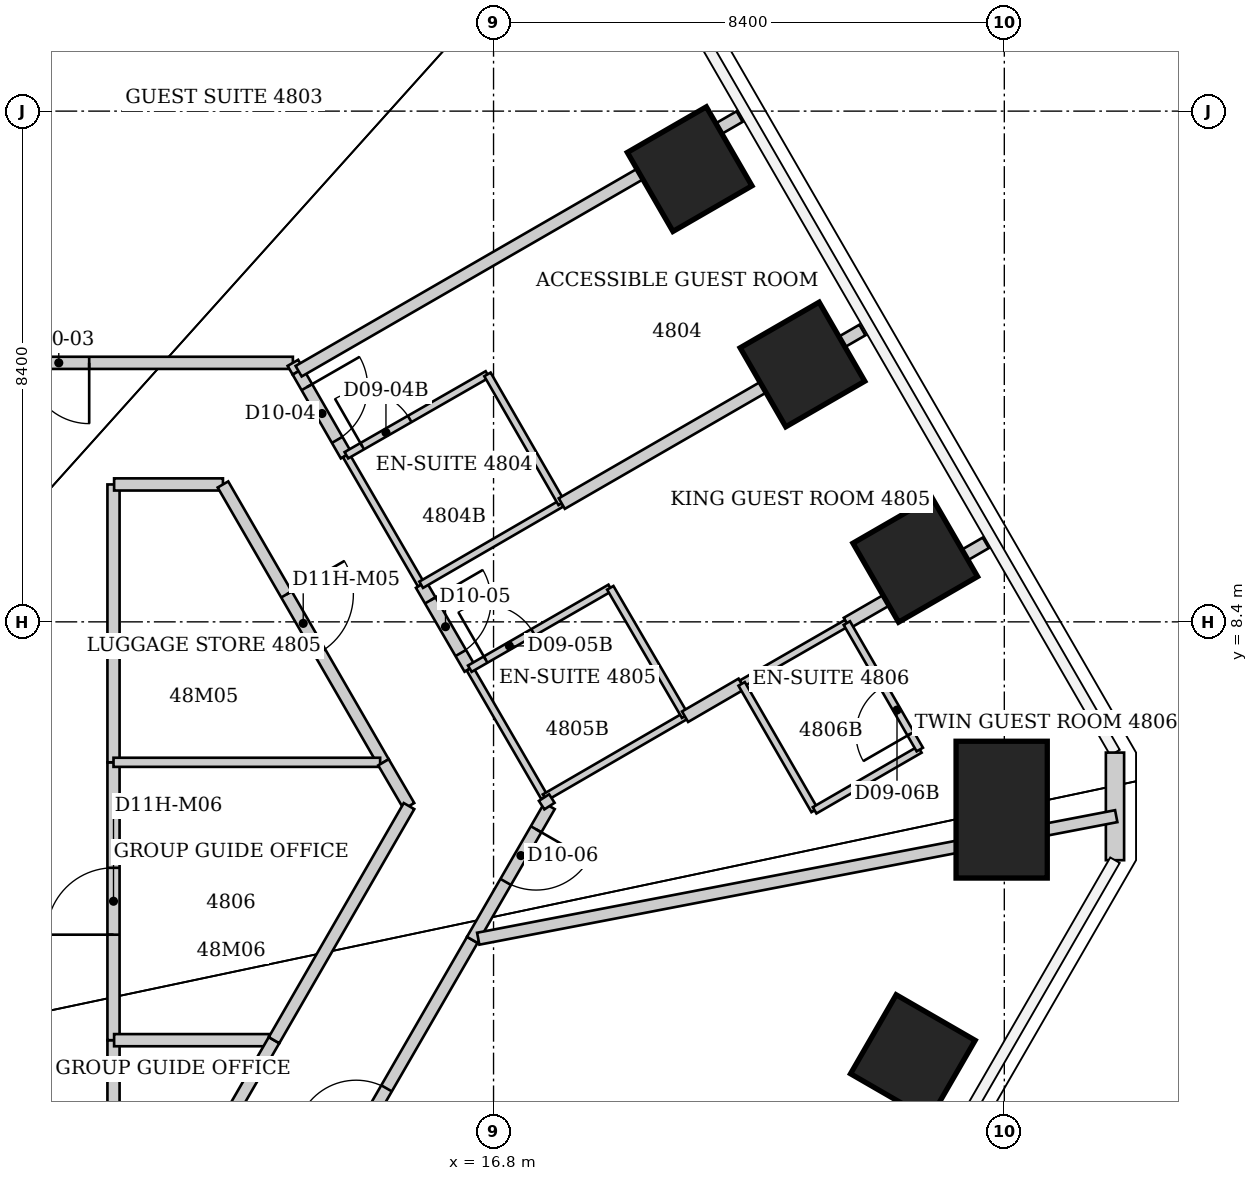
"""IFC4 building model, lengths in metres.
Left out: names, types, materials, properties, quantities, classifications, styles, units other than length and angle.
Written with IfcOpenShell. Run it as: python <this file> out.ifc"""

import sys

from ifc_helpers import new_model, si_unit, direction, frame, frame_2d, origin, origin_2d, place, context, subcontext, project, spatial, rectangle, extrude, element, fill, save


model = new_model("IFC4")
c1 = context("Model", 3, precision=1e-05, world=origin(), true_north=direction((0.0, 1.0)))
c2 = subcontext(c1, "Body", "Model", "MODEL_VIEW")
j1 = project(units=[si_unit("LENGTHUNIT", "METRE"), si_unit("PLANEANGLEUNIT", "RADIAN")], contexts=[c1])
p1 = place(None, origin())
s1 = spatial("IfcSite", under=j1, at=p1, CompositionType="ELEMENT")
p2 = place(p1, origin())
s2 = spatial("IfcBuilding", under=s1, at=p2, CompositionType="ELEMENT")
p3 = place(p2, frame((0.0, 0.0, 194.6)))
s3 = spatial("IfcBuildingStorey", under=s2, at=p3, CompositionType="ELEMENT", Elevation=194.6)
for number, where, z_axis, x_axis in (
    (1, (20.025, 15.846, 0.0), (0.0, 0.0, 1.0), (0.866, 0.5, 0.0)),
    (2, (21.88, 12.633, 0.0), (0.0, 0.0, 1.0), (0.866, 0.5, 0.0)),
    (3, (23.735, 9.419, 0.0), (0.0, 0.0, 1.0), (0.866, 0.5, 0.0)),
):
    element("IfcColumn", number, at=place(p3, frame(where, z_axis=z_axis, x_axis=x_axis)), inside=s3, PredefinedType="COLUMN", context=c2, shape_type="SweptSolid", body=[
        extrude(rectangle(XDim=1.5, YDim=1.5, at=origin_2d()), origin(), (0.0, 0.0, 1.0), 3.8),
    ])
p4 = place(p3, frame((25.156, 5.311, 0.0), z_axis=(0.0, 0.0, 1.0), x_axis=(1.0, 0.0, 0.0)))
e4 = element("IfcColumn", 4, at=p4, inside=s3, PredefinedType="COLUMN", context=c2, shape_type="SweptSolid", body=[
    extrude(rectangle(XDim=1.5, YDim=2.25, at=origin_2d()), origin(), (0.0, 0.0, 1.0), 3.8),
])
p5 = place(p3, frame((23.696, 1.242, 0.0), z_axis=(0.0, 0.0, 1.0), x_axis=(0.866025403784, -0.5, 0.0)))
e5 = element("IfcColumn", 5, at=p5, inside=s3, PredefinedType="COLUMN", context=c2, shape_type="SweptSolid", body=[
    extrude(rectangle(XDim=1.5, YDim=1.5, at=origin_2d()), origin(), (0.0, 0.0, 1.0), 3.8),
])
p6 = place(p3, frame((27.02, 6.25, 0.0), z_axis=(0.0, 0.0, 1.0), x_axis=(0.0, -1.0, 0.0)))
e6 = element("IfcWall", 6, at=p6, inside=s3, PredefinedType="SOLIDWALL", context=c2, shape_type="SweptSolid", body=[
    extrude(rectangle(XDim=1.77, YDim=0.3, at=frame_2d((0.885, 0.0))), origin(), (0.0, 0.0, 1.0), 3.64),
])
p7 = place(p3, frame((10.55, -2.855, 0.0), z_axis=(0.0, 0.0, 1.0), x_axis=(0.0, 1.0, 0.0)))
e7 = element("IfcWall", 7, at=p7, inside=s3, PredefinedType="PARTITIONING", context=c2, shape_type="SweptSolid", body=[
    extrude(rectangle(XDim=4.375, YDim=0.2, at=frame_2d((2.188, 0.0))), origin(), (0.0, 0.0, 1.0), 3.64),
])
p8 = place(p3, frame((10.55, 1.52, 0.0), z_axis=(0.0, 0.0, 1.0), x_axis=(0.0, 1.0, 0.0)))
e8 = element("IfcWall", 8, at=p8, inside=s3, PredefinedType="PARTITIONING", context=c2, shape_type="SweptSolid", body=[
    extrude(rectangle(XDim=4.57, YDim=0.2, at=frame_2d((2.285, 0.0))), origin(), (0.0, 0.0, 1.0), 3.64),
])
p9 = place(p8, frame((1.735, 0.0, 0.0)))
e9 = element("IfcOpeningElement", 9, at=p9, cuts=e8, PredefinedType="OPENING", context=c2, shape_type="SweptSolid", body=[
    extrude(rectangle(XDim=1.1, YDim=2.2, at=frame_2d((0.55, 1.1))), frame((0.0, 0.1, 0.0), z_axis=(0.0, -1.0, 0.0), x_axis=(1.0, 0.0, 0.0)), (0.0, 0.0, 1.0), 0.2),
])
p10 = place(p3, frame((10.55, 6.09, 0.0), z_axis=(0.0, 0.0, 1.0), x_axis=(0.0, 1.0, 0.0)))
e10 = element("IfcWall", 10, at=p10, inside=s3, PredefinedType="PARTITIONING", context=c2, shape_type="SweptSolid", body=[
    extrude(rectangle(XDim=4.57, YDim=0.2, at=frame_2d((2.285, 0.0))), origin(), (0.0, 0.0, 1.0), 3.64),
])
p11 = place(p3, frame((10.56, 1.52, 0.0), z_axis=(0.0, 0.0, 1.0), x_axis=(1.0, 0.0, 0.0)))
e11 = element("IfcWall", 11, at=p11, inside=s3, PredefinedType="PARTITIONING", context=c2, shape_type="SweptSolid", body=[
    extrude(rectangle(XDim=2.55, YDim=0.2, at=frame_2d((1.275, 0.0))), origin(), (0.0, 0.0, 1.0), 3.64),
])
p12 = place(p3, frame((10.56, 10.66, 0.0), z_axis=(0.0, 0.0, 1.0), x_axis=(1.0, 0.0, 0.0)))
e12 = element("IfcWall", 12, at=p12, inside=s3, PredefinedType="PARTITIONING", context=c2, shape_type="SweptSolid", body=[
    extrude(rectangle(XDim=1.79, YDim=0.2, at=frame_2d((0.895, 0.0))), origin(), (0.0, 0.0, 1.0), 3.64),
])
p13 = place(p3, frame((12.35, 10.66, 0.0), z_axis=(0.0, 0.0, 1.0), x_axis=(0.500213626659, -0.86590203124, 0.0)))
e13 = element("IfcWall", 13, at=p13, inside=s3, PredefinedType="PARTITIONING", context=c2, shape_type="SweptSolid", body=[
    extrude(rectangle(XDim=5.278, YDim=0.2, at=frame_2d((2.639, 0.0))), origin(), (0.0, 0.0, 1.0), 3.64),
])
p14 = place(p13, frame((2.089, 0.0, 0.0)))
e14 = element("IfcOpeningElement", 14, at=p14, cuts=e13, PredefinedType="OPENING", context=c2, shape_type="SweptSolid", body=[
    extrude(rectangle(XDim=1.1, YDim=2.2, at=frame_2d((0.55, 1.1))), frame((0.0, 0.1, 0.0), z_axis=(0.0, -1.0, 0.0), x_axis=(1.0, 0.0, 0.0)), (0.0, 0.0, 1.0), 0.2),
])
p15 = place(p3, frame((13.13, -2.58, 0.0), z_axis=(0.0, 0.0, 1.0), x_axis=(0.500148944124, 0.865939393775, 0.0)))
e15 = element("IfcWall", 15, at=p15, inside=s3, PredefinedType="PARTITIONING", context=c2, shape_type="SweptSolid", body=[
    extrude(rectangle(XDim=6.64, YDim=0.2, at=frame_2d((3.32, 0.0))), origin(), (0.0, 0.0, 1.0), 3.64),
])
p16 = place(p15, frame((2.82, 0.0, 0.0)))
e16 = element("IfcOpeningElement", 16, at=p16, cuts=e15, PredefinedType="OPENING", context=c2, shape_type="SweptSolid", body=[
    extrude(rectangle(XDim=1.0, YDim=2.13, at=frame_2d((0.5, 1.065))), frame((0.0, 0.1, 0.0), z_axis=(0.0, -1.0, 0.0), x_axis=(1.0, 0.0, 0.0)), (0.0, 0.0, 1.0), 0.2),
])
p17 = place(p3, frame((13.19, 1.52, 0.0), z_axis=(0.0, 0.0, 1.0), x_axis=(-0.500193590286, -0.865913605527, 0.0)))
e17 = element("IfcWall", 17, at=p17, inside=s3, PredefinedType="PARTITIONING", context=c2, shape_type="SweptSolid", body=[
    extrude(rectangle(XDim=5.278, YDim=0.2, at=frame_2d((2.639, 0.0))), origin(), (0.0, 0.0, 1.0), 3.64),
])
p18 = place(p17, frame((1.9, 0.0, 0.0)))
e18 = element("IfcOpeningElement", 18, at=p18, cuts=e17, PredefinedType="OPENING", context=c2, shape_type="SweptSolid", body=[
    extrude(rectangle(XDim=1.1, YDim=2.2, at=frame_2d((0.55, 1.1))), frame((0.0, 0.1, 0.0), z_axis=(0.0, -1.0, 0.0), x_axis=(1.0, 0.0, 0.0)), (0.0, 0.0, 1.0), 0.2),
])
p19 = place(p3, frame((13.5, 12.66, 0.0), z_axis=(0.0, 0.0, 1.0), x_axis=(-1.0, 0.0, 0.0)))
e19 = element("IfcWall", 19, at=p19, inside=s3, PredefinedType="PARTITIONING", context=c2, shape_type="SweptSolid", body=[
    extrude(rectangle(XDim=7.7, YDim=0.2, at=frame_2d((3.85, 0.0))), origin(), (0.0, 0.0, 1.0), 3.64),
])
p20 = place(p19, frame((3.35, 0.0, 0.0)))
e20 = element("IfcOpeningElement", 20, at=p20, cuts=e19, PredefinedType="OPENING", context=c2, shape_type="SweptSolid", body=[
    extrude(rectangle(XDim=1.0, YDim=2.13, at=frame_2d((0.5, 1.065))), frame((0.0, 0.1, 0.0), z_axis=(0.0, -1.0, 0.0), x_axis=(1.0, 0.0, 0.0)), (0.0, 0.0, 1.0), 0.2),
])
p21 = place(p3, frame((13.5, 12.66, 0.0), z_axis=(0.0, 0.0, 1.0), x_axis=(0.498194987799, -0.867065023013, 0.0)))
e21 = element("IfcWall", 21, at=p21, inside=s3, PredefinedType="PARTITIONING", context=c2, shape_type="SweptSolid", body=[
    extrude(rectangle(XDim=0.166, YDim=0.2, at=frame_2d((0.083, 0.0))), origin(), (0.0, 0.0, 1.0), 3.64),
])
p22 = place(p3, frame((13.583, 12.516, 0.0), z_axis=(0.0, 0.0, 1.0), x_axis=(0.498534585837, -0.866869809559, 0.0)))
e22 = element("IfcWall", 22, at=p22, inside=s3, PredefinedType="PARTITIONING", context=c2, shape_type="SweptSolid", body=[
    extrude(rectangle(XDim=1.59, YDim=0.2, at=frame_2d((0.795, 0.0))), origin(), (0.0, 0.0, 1.0), 3.64),
])
p23 = place(p22, frame((0.295, 0.0, 0.0)))
e23 = element("IfcOpeningElement", 23, at=p23, cuts=e22, PredefinedType="OPENING", context=c2, shape_type="SweptSolid", body=[
    extrude(rectangle(XDim=1.0, YDim=2.13, at=frame_2d((0.5, 1.065))), frame((0.0, 0.1, 0.0), z_axis=(0.0, -1.0, 0.0), x_axis=(1.0, 0.0, 0.0)), (0.0, 0.0, 1.0), 0.2),
])
p24 = place(p3, frame((14.375, 11.137, 0.0), z_axis=(0.0, 0.0, 1.0), x_axis=(0.501931973027, -0.864907101632, 0.0)))
e24 = element("IfcWall", 24, at=p24, inside=s3, PredefinedType="PARTITIONING", context=c2, shape_type="SweptSolid", body=[
    extrude(rectangle(XDim=2.46, YDim=0.12, at=frame_2d((1.23, 0.0))), origin(), (0.0, 0.0, 1.0), 3.64),
])
p25 = place(p3, frame((14.935, 6.09, 0.0), z_axis=(0.0, 0.0, 1.0), x_axis=(-1.0, 0.0, 0.0)))
e25 = element("IfcWall", 25, at=p25, inside=s3, PredefinedType="PARTITIONING", context=c2, shape_type="SweptSolid", body=[
    extrude(rectangle(XDim=4.385, YDim=0.15, at=frame_2d((2.192, 0.0))), origin(), (0.0, 0.0, 1.0), 3.64),
])
p26 = place(p3, frame((14.99, 6.09, 0.0), z_axis=(0.0, 0.0, 1.0), x_axis=(0.503816387241, -0.863810770914, 0.0)))
e26 = element("IfcWall", 26, at=p26, inside=s3, PredefinedType="PARTITIONING", context=c2, shape_type="SweptSolid", body=[
    extrude(rectangle(XDim=0.833, YDim=0.2, at=frame_2d((0.417, 0.0))), origin(), (0.0, 0.0, 1.0), 3.64),
])
p27 = place(p3, frame((15.41, 5.37, 0.0), z_axis=(0.0, 0.0, 1.0), x_axis=(-0.499513190454, -0.866306281036, 0.0)))
e27 = element("IfcWall", 27, at=p27, inside=s3, PredefinedType="PARTITIONING", context=c2, shape_type="SweptSolid", body=[
    extrude(rectangle(XDim=4.444, YDim=0.2, at=frame_2d((2.222, 0.0))), origin(), (0.0, 0.0, 1.0), 3.64),
])
p28 = place(p3, frame((15.61, 9.01, 0.0), z_axis=(0.0, 0.0, 1.0), x_axis=(0.5014706583, -0.865174652232, 0.0)))
e28 = element("IfcWall", 28, at=p28, inside=s3, PredefinedType="PARTITIONING", context=c2, shape_type="SweptSolid", body=[
    extrude(rectangle(XDim=1.595, YDim=0.2, at=frame_2d((0.797, 0.0))), origin(), (0.0, 0.0, 1.0), 3.64),
])
p29 = place(p28, frame((0.298, 0.0, 0.0)))
e29 = element("IfcOpeningElement", 29, at=p29, cuts=e28, PredefinedType="OPENING", context=c2, shape_type="SweptSolid", body=[
    extrude(rectangle(XDim=1.0, YDim=2.13, at=frame_2d((0.5, 1.065))), frame((0.0, 0.1, 0.0), z_axis=(0.0, -1.0, 0.0), x_axis=(1.0, 0.0, 0.0)), (0.0, 0.0, 1.0), 0.2),
])
p30 = place(p3, frame((16.41, 7.63, 0.0), z_axis=(0.0, 0.0, 1.0), x_axis=(0.501856726365, -0.86495076519, 0.0)))
e30 = element("IfcWall", 30, at=p30, inside=s3, PredefinedType="PARTITIONING", context=c2, shape_type="SweptSolid", body=[
    extrude(rectangle(XDim=2.451, YDim=0.12, at=frame_2d((1.226, 0.0))), origin(), (0.0, 0.0, 1.0), 3.64),
])
p31 = place(p3, frame((16.45, 3.17, 0.0), z_axis=(0.0, 0.0, 1.0), x_axis=(0.499922110319, 0.866070368743, 0.0)))
e31 = element("IfcWall", 31, at=p31, inside=s3, PredefinedType="PARTITIONING", context=c2, shape_type="SweptSolid", body=[
    extrude(rectangle(XDim=2.541, YDim=0.2, at=frame_2d((1.27, 0.0))), origin(), (0.0, 0.0, 1.0), 3.64),
])
p32 = place(p31, frame((1.1, 0.0, 0.0)))
e32 = element("IfcOpeningElement", 32, at=p32, cuts=e31, PredefinedType="OPENING", context=c2, shape_type="SweptSolid", body=[
    extrude(rectangle(XDim=1.0, YDim=2.13, at=frame_2d((0.5, 1.065))), frame((0.0, 0.1, 0.0), z_axis=(0.0, -1.0, 0.0), x_axis=(1.0, 0.0, 0.0)), (0.0, 0.0, 1.0), 0.2),
])
p33 = place(p3, frame((16.548, 3.189, 0.0), z_axis=(0.0, 0.0, 1.0), x_axis=(0.982047984466, 0.188631270488, 0.0)))
e33 = element("IfcWall", 33, at=p33, inside=s3, PredefinedType="PARTITIONING", context=c2, shape_type="SweptSolid", body=[
    extrude(rectangle(XDim=10.684, YDim=0.2, at=frame_2d((5.342, 0.0))), origin(), (0.0, 0.0, 1.0), 3.64),
])
p34 = place(p3, frame((16.7, 12.47, 0.0), z_axis=(0.0, 0.0, 1.0), x_axis=(-0.867545659855, -0.497357545501, 0.0)))
e34 = element("IfcWall", 34, at=p34, inside=s3, PredefinedType="PARTITIONING", context=c2, shape_type="SweptSolid", body=[
    extrude(rectangle(XDim=2.674, YDim=0.12, at=frame_2d((1.337, 0.0))), origin(), (0.0, 0.0, 1.0), 3.64),
])
p35 = place(p34, frame((1.474, 0.0, 0.0)))
e35 = element("IfcOpeningElement", 35, at=p35, cuts=e34, PredefinedType="OPENING", context=c2, shape_type="SweptSolid", body=[
    extrude(rectangle(XDim=0.9, YDim=2.03, at=frame_2d((0.45, 1.015))), frame((0.0, 0.06, 0.0), z_axis=(0.0, -1.0, 0.0), x_axis=(1.0, 0.0, 0.0)), (0.0, 0.0, 1.0), 0.12),
])
p36 = place(p3, frame((17.64, 5.51, 0.0), z_axis=(0.0, 0.0, 1.0), x_axis=(0.86498992408, 0.501789229896, 0.0)))
e36 = element("IfcWall", 36, at=p36, inside=s3, PredefinedType="PARTITIONING", context=c2, shape_type="SweptSolid", body=[
    extrude(rectangle(XDim=2.671, YDim=0.12, at=frame_2d((1.335, 0.0))), origin(), (0.0, 0.0, 1.0), 3.64),
])
p37 = place(p3, frame((17.72, 5.37, 0.0), z_axis=(0.0, 0.0, 1.0), x_axis=(-0.540386452408, 0.841416948994, 0.0)))
e37 = element("IfcWall", 37, at=p37, inside=s3, PredefinedType="PARTITIONING", context=c2, shape_type="SweptSolid", body=[
    extrude(rectangle(XDim=0.166, YDim=0.2, at=frame_2d((0.083, 0.0))), origin(), (0.0, 0.0, 1.0), 3.64),
])
p38 = place(p3, frame((17.92, 10.35, 0.0), z_axis=(0.0, 0.0, 1.0), x_axis=(-0.864966903181, -0.501828911485, 0.0)))
e38 = element("IfcWall", 38, at=p38, inside=s3, PredefinedType="PARTITIONING", context=c2, shape_type="SweptSolid", body=[
    extrude(rectangle(XDim=2.67, YDim=0.12, at=frame_2d((1.335, 0.0))), origin(), (0.0, 0.0, 1.0), 2.878),
])
p39 = place(p3, frame((17.92, 10.35, 0.0), z_axis=(0.0, 0.0, 1.0), x_axis=(-0.498791783817, 0.866721844883, 0.0)))
e39 = element("IfcWall", 39, at=p39, inside=s3, PredefinedType="PARTITIONING", context=c2, shape_type="SweptSolid", body=[
    extrude(rectangle(XDim=2.446, YDim=0.12, at=frame_2d((1.223, 0.0))), origin(), (0.0, 0.0, 1.0), 3.64),
])
p40 = place(p3, frame((17.923, 10.345, 0.0), z_axis=(0.0, 0.0, 1.0), x_axis=(0.865991848905, 0.500058114253, 0.0)))
e40 = element("IfcWall", 40, at=p40, inside=s3, PredefinedType="PARTITIONING", context=c2, shape_type="SweptSolid", body=[
    extrude(rectangle(XDim=5.708, YDim=0.2, at=frame_2d((2.854, 0.0))), origin(), (0.0, 0.0, 1.0), 2.878),
])
p41 = place(p3, frame((18.72, 8.96, 0.0), z_axis=(0.0, 0.0, 1.0), x_axis=(-0.866654860089, -0.498908161372, 0.0)))
e41 = element("IfcWall", 41, at=p41, inside=s3, PredefinedType="PARTITIONING", context=c2, shape_type="SweptSolid", body=[
    extrude(rectangle(XDim=2.666, YDim=0.12, at=frame_2d((1.333, 0.0))), origin(), (0.0, 0.0, 1.0), 3.64),
])
p42 = place(p41, frame((1.466, 0.0, 0.0)))
e42 = element("IfcOpeningElement", 42, at=p42, cuts=e41, PredefinedType="OPENING", context=c2, shape_type="SweptSolid", body=[
    extrude(rectangle(XDim=0.9, YDim=2.03, at=frame_2d((0.45, 1.015))), frame((0.0, 0.06, 0.0), z_axis=(0.0, -1.0, 0.0), x_axis=(1.0, 0.0, 0.0)), (0.0, 0.0, 1.0), 0.12),
])
p43 = place(p3, frame((19.95, 6.85, 0.0), z_axis=(0.0, 0.0, 1.0), x_axis=(-0.503634814725, 0.863916647251, 0.0)))
e43 = element("IfcWall", 43, at=p43, inside=s3, PredefinedType="PARTITIONING", context=c2, shape_type="SweptSolid", body=[
    extrude(rectangle(XDim=2.442, YDim=0.12, at=frame_2d((1.221, 0.0))), origin(), (0.0, 0.0, 1.0), 3.64),
])
p44 = place(p3, frame((20.846, 16.71, 0.0), z_axis=(0.0, 0.0, 1.0), x_axis=(-0.865987970466, -0.500064830806, 0.0)))
e44 = element("IfcWall", 44, at=p44, inside=s3, PredefinedType="PARTITIONING", context=c2, shape_type="SweptSolid", body=[
    extrude(rectangle(XDim=8.374, YDim=0.2, at=frame_2d((4.187, 0.0))), origin(), (0.0, 0.0, 1.0), 3.64),
])
p45 = place(p3, frame((20.878, 7.383, 0.0), z_axis=(0.0, 0.0, 1.0), x_axis=(0.866697688948, 0.498833755847, 0.0)))
e45 = element("IfcWall", 45, at=p45, inside=s3, PredefinedType="PARTITIONING", context=c2, shape_type="SweptSolid", body=[
    extrude(rectangle(XDim=1.998, YDim=0.12, at=frame_2d((0.999, 0.0))), origin(), (0.0, 0.0, 1.0), 3.64),
])
p46 = place(p3, frame((20.88, 7.38, 0.0), z_axis=(0.0, 0.0, 1.0), x_axis=(-0.864855730486, -0.502020483094, 0.0)))
e46 = element("IfcWall", 46, at=p46, inside=s3, PredefinedType="PARTITIONING", context=c2, shape_type="SweptSolid", body=[
    extrude(rectangle(XDim=1.075, YDim=0.2, at=frame_2d((0.538, 0.0))), origin(), (0.0, 0.0, 1.0), 3.64),
])
p47 = place(p3, frame((20.88, 7.38, 0.0), z_axis=(0.0, 0.0, 1.0), x_axis=(0.499813401482, -0.866133109688, 0.0)))
e47 = element("IfcWall", 47, at=p47, inside=s3, PredefinedType="PARTITIONING", context=c2, shape_type="SweptSolid", body=[
    extrude(rectangle(XDim=2.401, YDim=0.12, at=frame_2d((1.201, 0.0))), origin(), (0.0, 0.0, 1.0), 3.64),
])
p48 = place(p3, frame((22.08, 5.3, 0.0), z_axis=(0.0, 0.0, 1.0), x_axis=(0.865766263046, 0.50044857655, 0.0)))
e48 = element("IfcWall", 48, at=p48, inside=s3, PredefinedType="PARTITIONING", context=c2, shape_type="SweptSolid", body=[
    extrude(rectangle(XDim=1.998, YDim=0.12, at=frame_2d((0.999, 0.0))), origin(), (0.0, 0.0, 1.0), 3.64),
])
p49 = place(p3, frame((22.61, 8.38, 0.0), z_axis=(0.0, 0.0, 1.0), x_axis=(0.865974560031, 0.500088053625, 0.0)))
e49 = element("IfcWall", 49, at=p49, inside=s3, PredefinedType="PARTITIONING", context=c2, shape_type="SweptSolid", body=[
    extrude(rectangle(XDim=2.64, YDim=0.2, at=frame_2d((1.32, 0.0))), origin(), (0.0, 0.0, 1.0), 3.64),
])
p50 = place(p3, frame((23.81, 6.3, 0.0), z_axis=(0.0, 0.0, 1.0), x_axis=(-0.499737123639, 0.866177122335, 0.0)))
e50 = element("IfcWall", 50, at=p50, inside=s3, PredefinedType="PARTITIONING", context=c2, shape_type="SweptSolid", body=[
    extrude(rectangle(XDim=2.401, YDim=0.12, at=frame_2d((1.201, 0.0))), origin(), (0.0, 0.0, 1.0), 3.64),
])
p51 = place(p50, frame((0.3, 0.0, 0.0)))
e51 = element("IfcOpeningElement", 51, at=p51, cuts=e50, PredefinedType="OPENING", context=c2, shape_type="SweptSolid", body=[
    extrude(rectangle(XDim=0.9, YDim=2.03, at=frame_2d((0.45, 1.015))), frame((0.0, 0.06, 0.0), z_axis=(0.0, -1.0, 0.0), x_axis=(1.0, 0.0, 0.0)), (0.0, 0.0, 1.0), 0.12),
])
p52 = place(p20, origin())
e52 = element("IfcDoor", 52, at=p52, inside=s3, OperationType="SINGLE_SWING_LEFT", PredefinedType="DOOR", context=c2, shape_type="SweptSolid", body=[
    extrude(rectangle(XDim=1.0, YDim=2.13, at=frame_2d((0.5, 1.065))), frame((0.0, 0.025, 0.0), z_axis=(0.0, -1.0, 0.0), x_axis=(1.0, 0.0, 0.0)), (0.0, 0.0, 1.0), 0.05),
])
fill(e20, e52)
p53 = place(p23, origin())
e53 = element("IfcDoor", 53, at=p53, inside=s3, OperationType="SINGLE_SWING_LEFT", PredefinedType="DOOR", context=c2, shape_type="SweptSolid", body=[
    extrude(rectangle(XDim=1.0, YDim=2.13, at=frame_2d((0.5, 1.065))), frame((0.0, 0.025, 0.0), z_axis=(0.0, -1.0, 0.0), x_axis=(1.0, 0.0, 0.0)), (0.0, 0.0, 1.0), 0.05),
])
fill(e23, e53)
p54 = place(p35, origin())
e54 = element("IfcDoor", 54, at=p54, inside=s3, OperationType="SINGLE_SWING_RIGHT", PredefinedType="DOOR", context=c2, shape_type="SweptSolid", body=[
    extrude(rectangle(XDim=0.9, YDim=2.03, at=frame_2d((0.45, 1.015))), frame((0.0, 0.025, 0.0), z_axis=(0.0, -1.0, 0.0), x_axis=(1.0, 0.0, 0.0)), (0.0, 0.0, 1.0), 0.05),
])
fill(e35, e54)
p55 = place(p29, origin())
e55 = element("IfcDoor", 55, at=p55, inside=s3, OperationType="SINGLE_SWING_LEFT", PredefinedType="DOOR", context=c2, shape_type="SweptSolid", body=[
    extrude(rectangle(XDim=1.0, YDim=2.13, at=frame_2d((0.5, 1.065))), frame((0.0, 0.025, 0.0), z_axis=(0.0, -1.0, 0.0), x_axis=(1.0, 0.0, 0.0)), (0.0, 0.0, 1.0), 0.05),
])
fill(e29, e55)
p56 = place(p42, origin())
e56 = element("IfcDoor", 56, at=p56, inside=s3, OperationType="SINGLE_SWING_RIGHT", PredefinedType="DOOR", context=c2, shape_type="SweptSolid", body=[
    extrude(rectangle(XDim=0.9, YDim=2.03, at=frame_2d((0.45, 1.015))), frame((0.0, 0.025, 0.0), z_axis=(0.0, -1.0, 0.0), x_axis=(1.0, 0.0, 0.0)), (0.0, 0.0, 1.0), 0.05),
])
fill(e42, e56)
p57 = place(p32, origin())
e57 = element("IfcDoor", 57, at=p57, inside=s3, OperationType="SINGLE_SWING_RIGHT", PredefinedType="DOOR", context=c2, shape_type="SweptSolid", body=[
    extrude(rectangle(XDim=1.0, YDim=2.13, at=frame_2d((0.5, 1.065))), frame((0.0, 0.025, 0.0), z_axis=(0.0, -1.0, 0.0), x_axis=(1.0, 0.0, 0.0)), (0.0, 0.0, 1.0), 0.05),
])
fill(e32, e57)
p58 = place(p51, origin())
e58 = element("IfcDoor", 58, at=p58, inside=s3, OperationType="SINGLE_SWING_LEFT", PredefinedType="DOOR", context=c2, shape_type="SweptSolid", body=[
    extrude(rectangle(XDim=0.9, YDim=2.03, at=frame_2d((0.45, 1.015))), frame((0.0, 0.025, 0.0), z_axis=(0.0, -1.0, 0.0), x_axis=(1.0, 0.0, 0.0)), (0.0, 0.0, 1.0), 0.05),
])
fill(e51, e58)
p59 = place(p16, origin())
e59 = element("IfcDoor", 59, at=p59, inside=s3, OperationType="SINGLE_SWING_LEFT", PredefinedType="DOOR", context=c2, shape_type="SweptSolid", body=[
    extrude(rectangle(XDim=1.0, YDim=2.13, at=frame_2d((0.5, 1.065))), frame((0.0, 0.025, 0.0), z_axis=(0.0, -1.0, 0.0), x_axis=(1.0, 0.0, 0.0)), (0.0, 0.0, 1.0), 0.05),
])
fill(e16, e59)
p60 = place(p14, origin())
e60 = element("IfcDoor", 60, at=p60, inside=s3, OperationType="SINGLE_SWING_LEFT", PredefinedType="DOOR", context=c2, shape_type="SweptSolid", body=[
    extrude(rectangle(XDim=1.1, YDim=2.2, at=frame_2d((0.55, 1.1))), frame((0.0, 0.025, 0.0), z_axis=(0.0, -1.0, 0.0), x_axis=(1.0, 0.0, 0.0)), (0.0, 0.0, 1.0), 0.05),
])
fill(e14, e60)
p61 = place(p9, origin())
e61 = element("IfcDoor", 61, at=p61, inside=s3, OperationType="SINGLE_SWING_LEFT", PredefinedType="DOOR", context=c2, shape_type="SweptSolid", body=[
    extrude(rectangle(XDim=1.1, YDim=2.2, at=frame_2d((0.55, 1.1))), frame((0.0, 0.025, 0.0), z_axis=(0.0, -1.0, 0.0), x_axis=(1.0, 0.0, 0.0)), (0.0, 0.0, 1.0), 0.05),
])
fill(e9, e61)
save(model, sys.argv[1])
